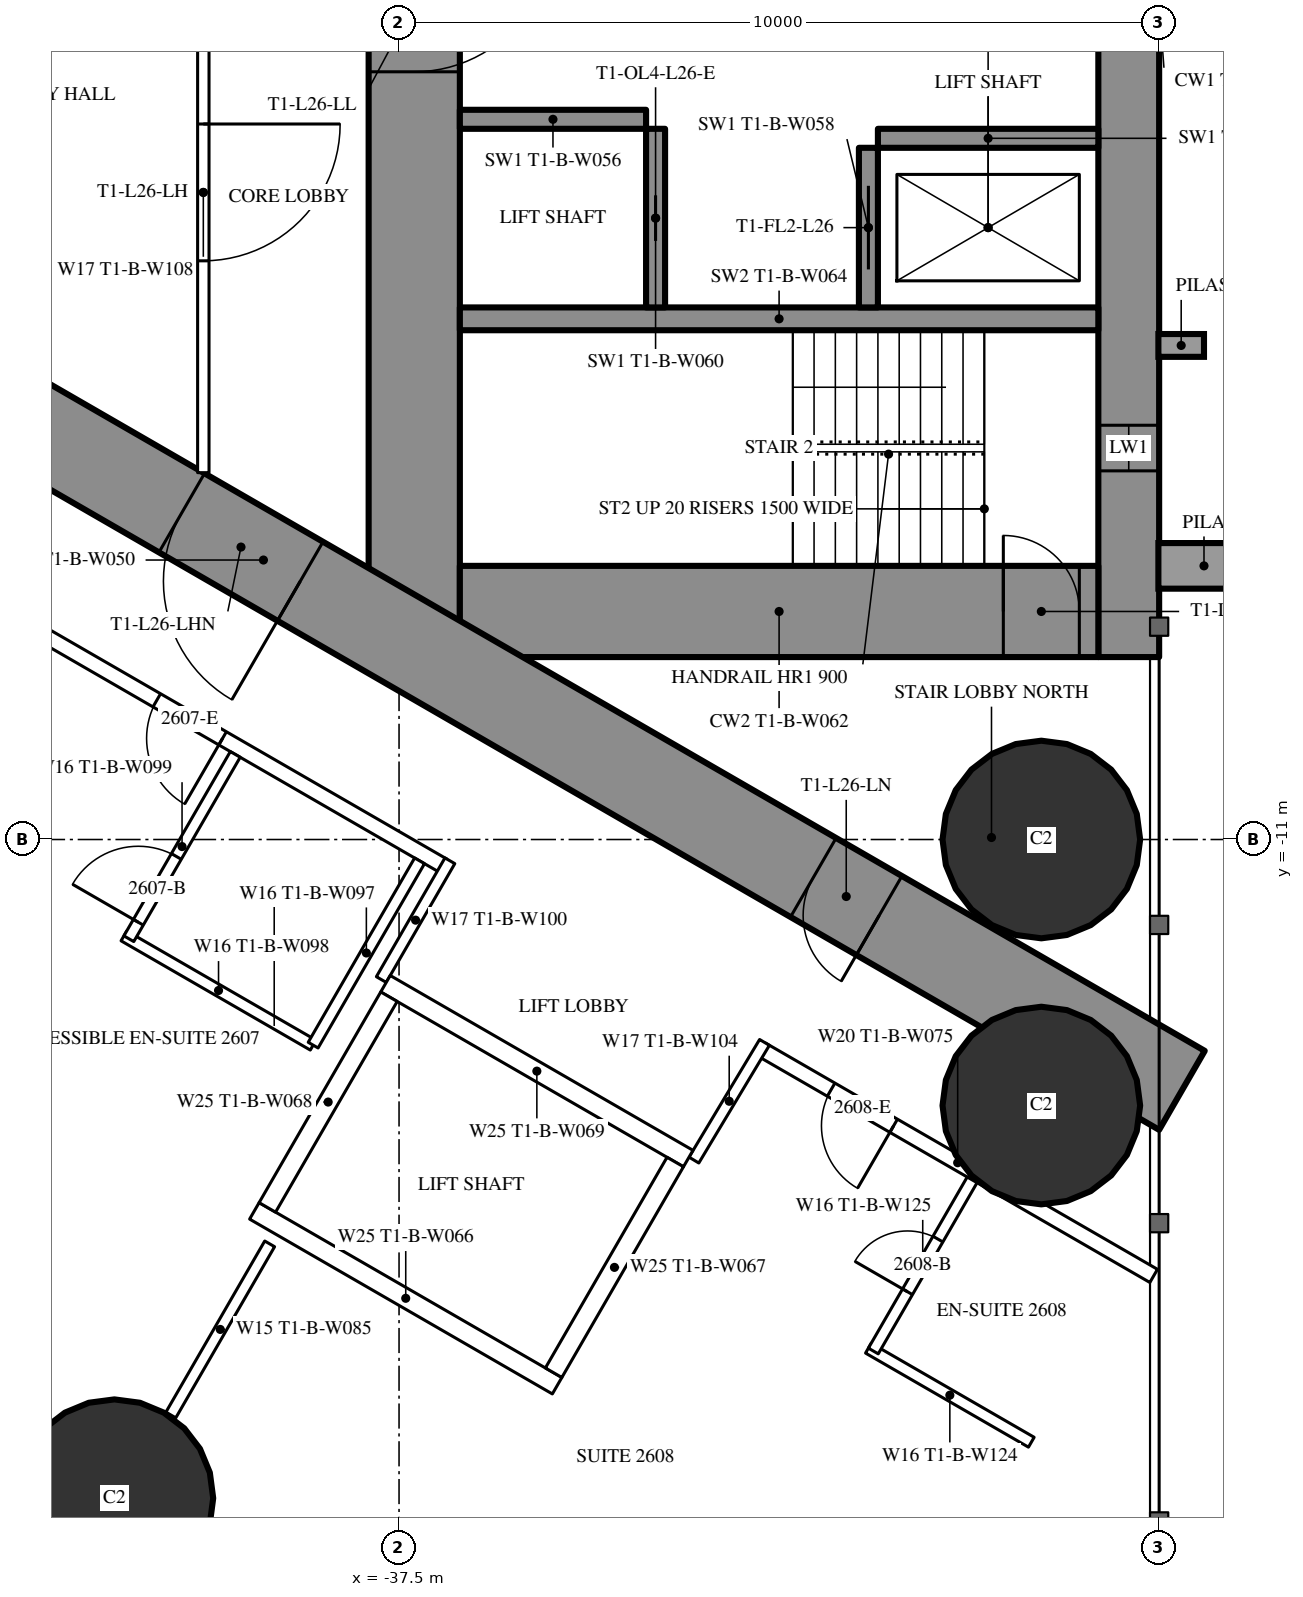
"""IFC4 building model, lengths in metres.
Left out: names, types, materials, properties, quantities, classifications, styles, units other than length and angle.
Written with IfcOpenShell. Run it as: python <this file> out.ifc"""

import sys

from ifc_helpers import new_model, si_unit, direction, frame, frame_2d, origin, origin_2d, place, context, subcontext, project, spatial, rectangle, hollow_circle, extrude, element, fill, save


model = new_model("IFC4")
c1 = context("Model", 3, precision=1e-05, world=origin(), true_north=direction((0.0, 1.0)))
c2 = subcontext(c1, "Body", "Model", "MODEL_VIEW")
j1 = project(units=[si_unit("LENGTHUNIT", "METRE"), si_unit("PLANEANGLEUNIT", "RADIAN")], contexts=[c1])
p1 = place(None, origin())
s1 = spatial("IfcSite", under=j1, at=p1, CompositionType="ELEMENT")
p2 = place(p1, origin())
s2 = spatial("IfcBuilding", under=s1, at=p2, CompositionType="ELEMENT")
p3 = place(p2, frame((0.0, 0.0, 101.1)))
s3 = spatial("IfcBuildingStorey", under=s2, at=p3, CompositionType="ELEMENT", Elevation=101.1)
for number, where, z_axis, x_axis in (
    (1, (-29.05, -11.0, 0.0), (0.0, 0.0, 1.0), (1.0, 0.0, 0.0)),
    (2, (-29.05, -14.5, 0.0), (0.0, 0.0, 1.0), (1.0, 0.0, 0.0)),
    (3, (-41.245, -19.666, 0.0), (0.0, 0.0, 1.0), (1.0, 0.0, 0.0)),
):
    element("IfcColumn", number, at=place(p3, frame(where, z_axis=z_axis, x_axis=x_axis)), inside=s3, PredefinedType="COLUMN", context=c2, shape_type="SweptSolid", body=[
        extrude(hollow_circle(Radius=1.3, WallThickness=0.1, at=origin_2d()), origin(), (0.0, 0.0, 1.0), 3.5),
    ])
p4 = place(p3, frame((-27.9, 8.6, 0.0), z_axis=(0.0, 0.0, 1.0), x_axis=(0.0, -1.0, 0.0)))
e4 = element("IfcWall", 4, at=p4, inside=s3, PredefinedType="SHEAR", context=c2, shape_type="SweptSolid", body=[
    extrude(rectangle(XDim=17.2, YDim=0.8, at=frame_2d((8.6, 0.0))), origin(), (0.0, 0.0, 1.0), 3.5),
])
p5 = place(p4, frame((2.45, 0.0, 0.6)))
e5 = element("IfcOpeningElement", 5, at=p5, cuts=e4, PredefinedType="OPENING", context=c2, shape_type="SweptSolid", body=[
    extrude(rectangle(XDim=0.6, YDim=2.1, at=frame_2d((0.3, 1.05))), frame((0.0, 0.41, 0.0), z_axis=(0.0, -1.0, 0.0), x_axis=(1.0, 0.0, 0.0)), (0.0, 0.0, 1.0), 0.82),
])
p6 = place(p4, frame((14.15, 0.0, 0.6)))
e6 = element("IfcOpeningElement", 6, at=p6, cuts=e4, PredefinedType="OPENING", context=c2, shape_type="SweptSolid", body=[
    extrude(rectangle(XDim=0.6, YDim=2.1, at=frame_2d((0.3, 1.05))), frame((0.0, 0.41, 0.0), z_axis=(0.0, -1.0, 0.0), x_axis=(1.0, 0.0, 0.0)), (0.0, 0.0, 1.0), 0.82),
])
p7 = place(p3, frame((-37.3, 8.6, 0.0), z_axis=(0.0, 0.0, 1.0), x_axis=(0.0, -1.0, 0.0)))
e7 = element("IfcWall", 7, at=p7, inside=s3, PredefinedType="SHEAR", context=c2, shape_type="SweptSolid", body=[
    extrude(rectangle(XDim=17.2, YDim=1.2, at=frame_2d((8.6, 0.0))), origin(), (0.0, 0.0, 1.0), 3.5),
])
p8 = place(p7, frame((7.7, 0.0, 0.0)))
e8 = element("IfcOpeningElement", 8, at=p8, cuts=e7, PredefinedType="OPENING", context=c2, shape_type="SweptSolid", body=[
    extrude(rectangle(XDim=1.8, YDim=2.2, at=frame_2d((0.9, 1.1))), frame((0.0, 0.61, 0.0), z_axis=(0.0, -1.0, 0.0), x_axis=(1.0, 0.0, 0.0)), (0.0, 0.0, 1.0), 1.22),
])
p9 = place(p3, frame((-28.3, -8.0, 0.0), z_axis=(0.0, 0.0, 1.0), x_axis=(-1.0, 0.0, 0.0)))
e9 = element("IfcWall", 9, at=p9, inside=s3, PredefinedType="SHEAR", context=c2, shape_type="SweptSolid", body=[
    extrude(rectangle(XDim=8.4, YDim=1.2, at=frame_2d((4.2, 0.0))), origin(), (0.0, 0.0, 1.0), 3.5),
])
p10 = place(p9, frame((0.25, 0.0, 0.0)))
e10 = element("IfcOpeningElement", 10, at=p10, cuts=e9, PredefinedType="OPENING", context=c2, shape_type="SweptSolid", body=[
    extrude(rectangle(XDim=1.0, YDim=2.2, at=frame_2d((0.5, 1.1))), frame((0.0, 0.61, 0.0), z_axis=(0.0, -1.0, 0.0), x_axis=(1.0, 0.0, 0.0)), (0.0, 0.0, 1.0), 1.22),
])
p11 = place(p3, frame((-28.3, -4.15, 0.0), z_axis=(0.0, 0.0, 1.0), x_axis=(-1.0, 0.0, 0.0)))
e11 = element("IfcWall", 11, at=p11, inside=s3, PredefinedType="SHEAR", context=c2, shape_type="SweptSolid", body=[
    extrude(rectangle(XDim=8.4, YDim=0.3, at=frame_2d((4.2, 0.0))), origin(), (0.0, 0.0, 1.0), 3.5),
])
p12 = place(p3, frame((-31.325, -1.9, 0.0), z_axis=(0.0, 0.0, 1.0), x_axis=(0.0, -1.0, 0.0)))
e12 = element("IfcWall", 12, at=p12, inside=s3, PredefinedType="SHEAR", context=c2, shape_type="SweptSolid", body=[
    extrude(rectangle(XDim=2.1, YDim=0.25, at=frame_2d((1.05, 0.0))), origin(), (0.0, 0.0, 1.0), 3.5),
])
p13 = place(p12, frame((0.5, 0.0, 0.0)))
e13 = element("IfcOpeningElement", 13, at=p13, cuts=e12, PredefinedType="OPENING", context=c2, shape_type="SweptSolid", body=[
    extrude(rectangle(XDim=1.1, YDim=2.2, at=frame_2d((0.55, 1.1))), frame((0.0, 0.135, 0.0), z_axis=(0.0, -1.0, 0.0), x_axis=(1.0, 0.0, 0.0)), (0.0, 0.0, 1.0), 0.27),
])
p14 = place(p3, frame((-34.125, -1.65, 0.0), z_axis=(0.0, 0.0, 1.0), x_axis=(0.0, -1.0, 0.0)))
e14 = element("IfcWall", 14, at=p14, inside=s3, PredefinedType="SHEAR", context=c2, shape_type="SweptSolid", body=[
    extrude(rectangle(XDim=2.35, YDim=0.25, at=frame_2d((1.175, 0.0))), origin(), (0.0, 0.0, 1.0), 3.5),
])
p15 = place(p14, frame((0.875, 0.0, 0.0)))
e15 = element("IfcOpeningElement", 15, at=p15, cuts=e14, PredefinedType="OPENING", context=c2, shape_type="SweptSolid", body=[
    extrude(rectangle(XDim=0.6, YDim=2.0, at=frame_2d((0.3, 1.0))), frame((0.0, 0.135, 0.0), z_axis=(0.0, -1.0, 0.0), x_axis=(1.0, 0.0, 0.0)), (0.0, 0.0, 1.0), 0.27),
])
p16 = place(p3, frame((-28.3, -1.775, 0.0), z_axis=(0.0, 0.0, 1.0), x_axis=(-1.0, 0.0, 0.0)))
e16 = element("IfcWall", 16, at=p16, inside=s3, PredefinedType="SHEAR", context=c2, shape_type="SweptSolid", body=[
    extrude(rectangle(XDim=2.9, YDim=0.25, at=frame_2d((1.45, 0.0))), origin(), (0.0, 0.0, 1.0), 3.5),
])
p17 = place(p3, frame((-34.25, -1.525, 0.0), z_axis=(0.0, 0.0, 1.0), x_axis=(-1.0, 0.0, 0.0)))
e17 = element("IfcWall", 17, at=p17, inside=s3, PredefinedType="SHEAR", context=c2, shape_type="SweptSolid", body=[
    extrude(rectangle(XDim=2.45, YDim=0.25, at=frame_2d((1.225, 0.0))), origin(), (0.0, 0.0, 1.0), 3.5),
])
p18 = place(p3, frame((-27.2, 14.3, 0.0), z_axis=(0.0, 0.0, 1.0), x_axis=(-0.866026593062, -0.499997940104, 0.0)))
e18 = element("IfcWall", 18, at=p18, inside=s3, PredefinedType="SHEAR", context=c2, shape_type="SweptSolid", body=[
    extrude(rectangle(XDim=28.946, YDim=1.2, at=frame_2d((14.473, 0.0))), origin(), (0.0, 0.0, 1.0), 3.5),
])
p19 = place(p18, frame((4.6, 0.0, 0.0)))
e19 = element("IfcOpeningElement", 19, at=p19, cuts=e18, PredefinedType="OPENING", context=c2, shape_type="SweptSolid", body=[
    extrude(rectangle(XDim=1.0, YDim=2.2, at=frame_2d((0.5, 1.1))), frame((0.0, 0.61, 0.0), z_axis=(0.0, -1.0, 0.0), x_axis=(1.0, 0.0, 0.0)), (0.0, 0.0, 1.0), 1.22),
])
p20 = place(p18, frame((13.395, 0.0, 0.0)))
e20 = element("IfcOpeningElement", 20, at=p20, cuts=e18, PredefinedType="OPENING", context=c2, shape_type="SweptSolid", body=[
    extrude(rectangle(XDim=1.8, YDim=2.2, at=frame_2d((0.9, 1.1))), frame((0.0, 0.61, 0.0), z_axis=(0.0, -1.0, 0.0), x_axis=(1.0, 0.0, 0.0)), (0.0, 0.0, 1.0), 1.22),
])
p21 = place(p3, frame((-27.2, -14.3, 0.0), z_axis=(0.0, 0.0, 1.0), x_axis=(-0.866024021859, 0.500002393557, 0.0)))
e21 = element("IfcWall", 21, at=p21, inside=s3, PredefinedType="SHEAR", context=c2, shape_type="SweptSolid", body=[
    extrude(rectangle(XDim=27.907, YDim=1.2, at=frame_2d((13.954, 0.0))), origin(), (0.0, 0.0, 1.0), 3.5),
])
p22 = place(p21, frame((4.6, 0.0, 0.0)))
e22 = element("IfcOpeningElement", 22, at=p22, cuts=e21, PredefinedType="OPENING", context=c2, shape_type="SweptSolid", body=[
    extrude(rectangle(XDim=1.0, YDim=2.2, at=frame_2d((0.5, 1.1))), frame((0.0, 0.61, 0.0), z_axis=(0.0, -1.0, 0.0), x_axis=(1.0, 0.0, 0.0)), (0.0, 0.0, 1.0), 1.22),
])
p23 = place(p21, frame((13.395, 0.0, 0.0)))
e23 = element("IfcOpeningElement", 23, at=p23, cuts=e21, PredefinedType="OPENING", context=c2, shape_type="SweptSolid", body=[
    extrude(rectangle(XDim=1.8, YDim=2.2, at=frame_2d((0.9, 1.1))), frame((0.0, 0.61, 0.0), z_axis=(0.0, -1.0, 0.0), x_axis=(1.0, 0.0, 0.0)), (0.0, 0.0, 1.0), 1.22),
])
p24 = place(p3, frame((-39.202, -16.32, 0.0), z_axis=(0.0, 0.0, 1.0), x_axis=(-0.49997716683, -0.86603858612, 0.0)))
e24 = element("IfcWall", 24, at=p24, inside=s3, PredefinedType="PARTITIONING", context=c2, shape_type="SweptSolid", body=[
    extrude(rectangle(XDim=2.6, YDim=0.15, at=frame_2d((1.3, 0.0))), origin(), (0.0, 0.0, 1.0), 3.25),
])
p25 = place(p3, frame((-27.572, -16.741, 0.0), z_axis=(0.0, 0.0, 1.0), x_axis=(-0.866024464444, 0.500001626982, 0.0)))
e25 = element("IfcWall", 25, at=p25, inside=s3, PredefinedType="PARTITIONING", context=c2, shape_type="SweptSolid", body=[
    extrude(rectangle(XDim=5.955, YDim=0.2, at=frame_2d((2.978, 0.0))), origin(), (0.0, 0.0, 1.0), 3.25),
])
p26 = place(p25, frame((3.95, 0.0, 0.0)))
e26 = element("IfcOpeningElement", 26, at=p26, cuts=e25, PredefinedType="OPENING", context=c2, shape_type="SweptSolid", body=[
    extrude(rectangle(XDim=0.95, YDim=2.2, at=frame_2d((0.475, 1.1))), frame((0.0, 0.11, 0.0), z_axis=(0.0, -1.0, 0.0), x_axis=(1.0, 0.0, 0.0)), (0.0, 0.0, 1.0), 0.22),
])
p27 = place(p3, frame((-36.92, -11.344, 0.0), z_axis=(0.0, 0.0, 1.0), x_axis=(-0.866028313256, 0.499994960614, 0.0)))
e27 = element("IfcWall", 27, at=p27, inside=s3, PredefinedType="PARTITIONING", context=c2, shape_type="SweptSolid", body=[
    extrude(rectangle(XDim=22.568, YDim=0.2, at=frame_2d((11.284, 0.0))), origin(), (0.0, 0.0, 1.0), 3.25),
])
p28 = place(p27, frame((21.018, 0.0, 0.0)))
e28 = element("IfcOpeningElement", 28, at=p28, cuts=e27, PredefinedType="OPENING", context=c2, shape_type="SweptSolid", body=[
    extrude(rectangle(XDim=0.95, YDim=2.2, at=frame_2d((0.475, 1.1))), frame((0.0, 0.11, 0.0), z_axis=(0.0, -1.0, 0.0), x_axis=(1.0, 0.0, 0.0)), (0.0, 0.0, 1.0), 0.22),
])
p29 = place(p27, frame((3.35, 0.0, 0.0)))
e29 = element("IfcOpeningElement", 29, at=p29, cuts=e27, PredefinedType="OPENING", context=c2, shape_type="SweptSolid", body=[
    extrude(rectangle(XDim=1.0, YDim=2.2, at=frame_2d((0.5, 1.1))), frame((0.0, 0.11, 0.0), z_axis=(0.0, -1.0, 0.0), x_axis=(1.0, 0.0, 0.0)), (0.0, 0.0, 1.0), 0.22),
])
p30 = place(p3, frame((-36.831, -11.28, 0.0), z_axis=(0.0, 0.0, 1.0), x_axis=(-0.499937177781, -0.866061671171, 0.0)))
e30 = element("IfcWall", 30, at=p30, inside=s3, PredefinedType="PARTITIONING", context=c2, shape_type="SweptSolid", body=[
    extrude(rectangle(XDim=1.804, YDim=0.15, at=frame_2d((0.902, 0.0))), origin(), (0.0, 0.0, 1.0), 3.25),
])
p31 = place(p3, frame((-33.621, -15.218, 0.0), z_axis=(0.0, 0.0, 1.0), x_axis=(0.514336634837, 0.857588377991, 0.0)))
e31 = element("IfcWall", 31, at=p31, inside=s3, PredefinedType="PARTITIONING", context=c2, shape_type="SweptSolid", body=[
    extrude(rectangle(XDim=1.805, YDim=0.15, at=frame_2d((0.903, 0.0))), origin(), (0.0, 0.0, 1.0), 3.25),
])
p32 = place(p3, frame((-38.63, -13.705, 0.0), z_axis=(0.0, 0.0, 1.0), x_axis=(-0.866018712932, 0.500011588718, 0.0)))
e32 = element("IfcWall", 32, at=p32, inside=s3, PredefinedType="PARTITIONING", context=c2, shape_type="SweptSolid", body=[
    extrude(rectangle(XDim=2.875, YDim=0.15, at=frame_2d((1.438, 0.0))), origin(), (0.0, 0.0, 1.0), 3.25),
])
p33 = place(p3, frame((-39.655, -9.88, 0.0), z_axis=(0.0, 0.0, 1.0), x_axis=(-0.500049511043, -0.865996816683, 0.0)))
e33 = element("IfcWall", 33, at=p33, inside=s3, PredefinedType="PARTITIONING", context=c2, shape_type="SweptSolid", body=[
    extrude(rectangle(XDim=2.8, YDim=0.15, at=frame_2d((1.4, 0.0))), origin(), (0.0, 0.0, 1.0), 3.25),
])
p34 = place(p33, frame((1.55, 0.0, 0.0)))
e34 = element("IfcOpeningElement", 34, at=p34, cuts=e33, PredefinedType="OPENING", context=c2, shape_type="SweptSolid", body=[
    extrude(rectangle(XDim=1.0, YDim=2.2, at=frame_2d((0.5, 1.1))), frame((0.0, 0.085, 0.0), z_axis=(0.0, -1.0, 0.0), x_axis=(1.0, 0.0, 0.0)), (0.0, 0.0, 1.0), 0.17),
])
p35 = place(p3, frame((-37.23, -11.281, 0.0), z_axis=(0.0, 0.0, 1.0), x_axis=(-0.500049511043, -0.865996816683, 0.0)))
e35 = element("IfcWall", 35, at=p35, inside=s3, PredefinedType="PARTITIONING", context=c2, shape_type="SweptSolid", body=[
    extrude(rectangle(XDim=2.8, YDim=0.15, at=frame_2d((1.4, 0.0))), origin(), (0.0, 0.0, 1.0), 3.25),
])
p36 = place(p3, frame((-29.182, -18.929, 0.0), z_axis=(0.0, 0.0, 1.0), x_axis=(-0.866006523861, 0.500032699561, 0.0)))
e36 = element("IfcWall", 36, at=p36, inside=s3, PredefinedType="PARTITIONING", context=c2, shape_type="SweptSolid", body=[
    extrude(rectangle(XDim=2.475, YDim=0.15, at=frame_2d((1.237, 0.0))), origin(), (0.0, 0.0, 1.0), 3.25),
])
p37 = place(p3, frame((-29.96, -15.478, 0.0), z_axis=(0.0, 0.0, 1.0), x_axis=(-0.500006934395, -0.866021400173, 0.0)))
e37 = element("IfcWall", 37, at=p37, inside=s3, PredefinedType="PARTITIONING", context=c2, shape_type="SweptSolid", body=[
    extrude(rectangle(XDim=2.6, YDim=0.15, at=frame_2d((1.3, 0.0))), origin(), (0.0, 0.0, 1.0), 3.25),
])
p38 = place(p37, frame((0.9, 0.0, 0.0)))
e38 = element("IfcOpeningElement", 38, at=p38, cuts=e37, PredefinedType="OPENING", context=c2, shape_type="SweptSolid", body=[
    extrude(rectangle(XDim=0.8, YDim=2.2, at=frame_2d((0.4, 1.1))), frame((0.0, 0.085, 0.0), z_axis=(0.0, -1.0, 0.0), x_axis=(1.0, 0.0, 0.0)), (0.0, 0.0, 1.0), 0.17),
])
p39 = place(p3, frame((-40.075, 1.2, 0.0), z_axis=(0.0, 0.0, 1.0), x_axis=(0.0, -1.0, 0.0)))
e39 = element("IfcWall", 39, at=p39, inside=s3, PredefinedType="PARTITIONING", context=c2, shape_type="SweptSolid", body=[
    extrude(rectangle(XDim=7.374, YDim=0.15, at=frame_2d((3.687, 0.0))), origin(), (0.0, 0.0, 1.0), 3.25),
])
p40 = place(p39, frame((2.787, 0.0, 0.0)))
e40 = element("IfcOpeningElement", 40, at=p40, cuts=e39, PredefinedType="OPENING", context=c2, shape_type="SweptSolid", body=[
    extrude(rectangle(XDim=1.8, YDim=2.2, at=frame_2d((0.9, 1.1))), frame((0.0, 0.085, 0.0), z_axis=(0.0, -1.0, 0.0), x_axis=(1.0, 0.0, 0.0)), (0.0, 0.0, 1.0), 0.17),
])
p41 = place(p3, frame((-33.696, -15.197, 0.0), z_axis=(0.0, 0.0, 1.0), x_axis=(-0.865976953817, 0.500083908417, 0.0)))
e41 = element("IfcWall", 41, at=p41, inside=s3, PredefinedType="PARTITIONING", context=c2, shape_type="SweptSolid", body=[
    extrude(rectangle(XDim=4.599, YDim=0.25, at=frame_2d((2.3, 0.0))), origin(), (0.0, 0.0, 1.0), 3.25),
])
p42 = place(p3, frame((-35.42, -18.186, 0.0), z_axis=(0.0, 0.0, 1.0), x_axis=(-0.865990227814, 0.50006092162, 0.0)))
e42 = element("IfcWall", 42, at=p42, inside=s3, PredefinedType="PARTITIONING", context=c2, shape_type="SweptSolid", body=[
    extrude(rectangle(XDim=4.6, YDim=0.25, at=frame_2d((2.3, 0.0))), origin(), (0.0, 0.0, 1.0), 3.25),
])
p43 = place(p3, frame((-33.866, -15.243, 0.0), z_axis=(0.0, 0.0, 1.0), x_axis=(-0.499929347863, -0.866066190972, 0.0)))
e43 = element("IfcWall", 43, at=p43, inside=s3, PredefinedType="PARTITIONING", context=c2, shape_type="SweptSolid", body=[
    extrude(rectangle(XDim=3.201, YDim=0.25, at=frame_2d((1.6, 0.0))), origin(), (0.0, 0.0, 1.0), 3.25),
])
p44 = place(p3, frame((-37.633, -13.068, 0.0), z_axis=(0.0, 0.0, 1.0), x_axis=(-0.499872130319, -0.866099216793, 0.0)))
e44 = element("IfcWall", 44, at=p44, inside=s3, PredefinedType="PARTITIONING", context=c2, shape_type="SweptSolid", body=[
    extrude(rectangle(XDim=3.2, YDim=0.25, at=frame_2d((1.6, 0.0))), origin(), (0.0, 0.0, 1.0), 3.25),
])
p45 = place(p34, origin())
e45 = element("IfcDoor", 45, at=p45, inside=s3, OperationType="SINGLE_SWING_RIGHT", PredefinedType="DOOR", context=c2, shape_type="SweptSolid", body=[
    extrude(rectangle(XDim=1.0, YDim=2.2, at=frame_2d((0.5, 1.1))), frame((0.0, 0.025, 0.0), z_axis=(0.0, -1.0, 0.0), x_axis=(1.0, 0.0, 0.0)), (0.0, 0.0, 1.0), 0.05),
])
fill(e34, e45)
p46 = place(p29, origin())
e46 = element("IfcDoor", 46, at=p46, inside=s3, OperationType="SINGLE_SWING_LEFT", PredefinedType="DOOR", context=c2, shape_type="SweptSolid", body=[
    extrude(rectangle(XDim=1.0, YDim=2.2, at=frame_2d((0.5, 1.1))), frame((0.0, 0.025, 0.0), z_axis=(0.0, -1.0, 0.0), x_axis=(1.0, 0.0, 0.0)), (0.0, 0.0, 1.0), 0.05),
])
fill(e29, e46)
p47 = place(p38, origin())
e47 = element("IfcDoor", 47, at=p47, inside=s3, OperationType="SINGLE_SWING_RIGHT", PredefinedType="DOOR", context=c2, shape_type="SweptSolid", body=[
    extrude(rectangle(XDim=0.8, YDim=2.2, at=frame_2d((0.4, 1.1))), frame((0.0, 0.025, 0.0), z_axis=(0.0, -1.0, 0.0), x_axis=(1.0, 0.0, 0.0)), (0.0, 0.0, 1.0), 0.05),
])
fill(e38, e47)
p48 = place(p26, origin())
e48 = element("IfcDoor", 48, at=p48, inside=s3, OperationType="SINGLE_SWING_LEFT", PredefinedType="DOOR", context=c2, shape_type="SweptSolid", body=[
    extrude(rectangle(XDim=0.95, YDim=2.2, at=frame_2d((0.475, 1.1))), frame((0.0, 0.025, 0.0), z_axis=(0.0, -1.0, 0.0), x_axis=(1.0, 0.0, 0.0)), (0.0, 0.0, 1.0), 0.05),
])
fill(e26, e48)
p49 = place(p40, origin())
e49 = element("IfcDoor", 49, at=p49, inside=s3, OperationType="DOUBLE_DOOR_SINGLE_SWING", PredefinedType="DOOR", context=c2, shape_type="SweptSolid", body=[
    extrude(rectangle(XDim=1.8, YDim=2.2, at=frame_2d((0.9, 1.1))), frame((0.0, 0.025, 0.0), z_axis=(0.0, -1.0, 0.0), x_axis=(1.0, 0.0, 0.0)), (0.0, 0.0, 1.0), 0.05),
])
fill(e40, e49)
p50 = place(p22, origin())
e50 = element("IfcDoor", 50, at=p50, inside=s3, OperationType="SINGLE_SWING_LEFT", PredefinedType="DOOR", context=c2, shape_type="SweptSolid", body=[
    extrude(rectangle(XDim=1.0, YDim=2.2, at=frame_2d((0.5, 1.1))), frame((0.0, 0.025, 0.0), z_axis=(0.0, -1.0, 0.0), x_axis=(1.0, 0.0, 0.0)), (0.0, 0.0, 1.0), 0.05),
])
fill(e22, e50)
p51 = place(p23, origin())
e51 = element("IfcDoor", 51, at=p51, inside=s3, OperationType="DOUBLE_DOOR_SINGLE_SWING", PredefinedType="DOOR", context=c2, shape_type="SweptSolid", body=[
    extrude(rectangle(XDim=1.8, YDim=2.2, at=frame_2d((0.9, 1.1))), frame((0.0, 0.025, 0.0), z_axis=(0.0, -1.0, 0.0), x_axis=(1.0, 0.0, 0.0)), (0.0, 0.0, 1.0), 0.05),
])
fill(e23, e51)
p52 = place(p8, origin())
e52 = element("IfcDoor", 52, at=p52, inside=s3, OperationType="DOUBLE_DOOR_SINGLE_SWING", PredefinedType="DOOR", context=c2, shape_type="SweptSolid", body=[
    extrude(rectangle(XDim=1.8, YDim=2.2, at=frame_2d((0.9, 1.1))), frame((0.0, 0.025, 0.0), z_axis=(0.0, -1.0, 0.0), x_axis=(1.0, 0.0, 0.0)), (0.0, 0.0, 1.0), 0.05),
])
fill(e8, e52)
p53 = place(p10, origin())
e53 = element("IfcDoor", 53, at=p53, inside=s3, OperationType="SINGLE_SWING_RIGHT", PredefinedType="DOOR", context=c2, shape_type="SweptSolid", body=[
    extrude(rectangle(XDim=1.0, YDim=2.2, at=frame_2d((0.5, 1.1))), frame((0.0, 0.025, 0.0), z_axis=(0.0, -1.0, 0.0), x_axis=(1.0, 0.0, 0.0)), (0.0, 0.0, 1.0), 0.05),
])
fill(e10, e53)
p54 = place(p13, origin())
e54 = element("IfcDoor", 54, at=p54, inside=s3, OperationType="SLIDING_TO_LEFT", PredefinedType="USERDEFINED", context=c2, shape_type="SweptSolid", body=[
    extrude(rectangle(XDim=1.1, YDim=2.2, at=frame_2d((0.55, 1.1))), frame((0.0, 0.025, 0.0), z_axis=(0.0, -1.0, 0.0), x_axis=(1.0, 0.0, 0.0)), (0.0, 0.0, 1.0), 0.05),
])
fill(e13, e54)
p55 = place(p15, origin())
e55 = element("IfcDoor", 55, at=p55, inside=s3, OperationType="SLIDING_TO_LEFT", PredefinedType="DOOR", context=c2, shape_type="SweptSolid", body=[
    extrude(rectangle(XDim=0.6, YDim=2.0, at=frame_2d((0.3, 1.0))), frame((0.0, 0.025, 0.0), z_axis=(0.0, -1.0, 0.0), x_axis=(1.0, 0.0, 0.0)), (0.0, 0.0, 1.0), 0.05),
])
fill(e15, e55)
p56 = place(p6, origin())
e56 = element("IfcWindow", 56, at=p56, inside=s3, PartitioningType="SINGLE_PANEL", PredefinedType="WINDOW", context=c2, shape_type="SweptSolid", body=[
    extrude(rectangle(XDim=0.6, YDim=2.1, at=frame_2d((0.3, 1.05))), frame((0.0, 0.03, 0.0), z_axis=(0.0, -1.0, 0.0), x_axis=(1.0, 0.0, 0.0)), (0.0, 0.0, 1.0), 0.06),
])
fill(e6, e56)
save(model, sys.argv[1])
